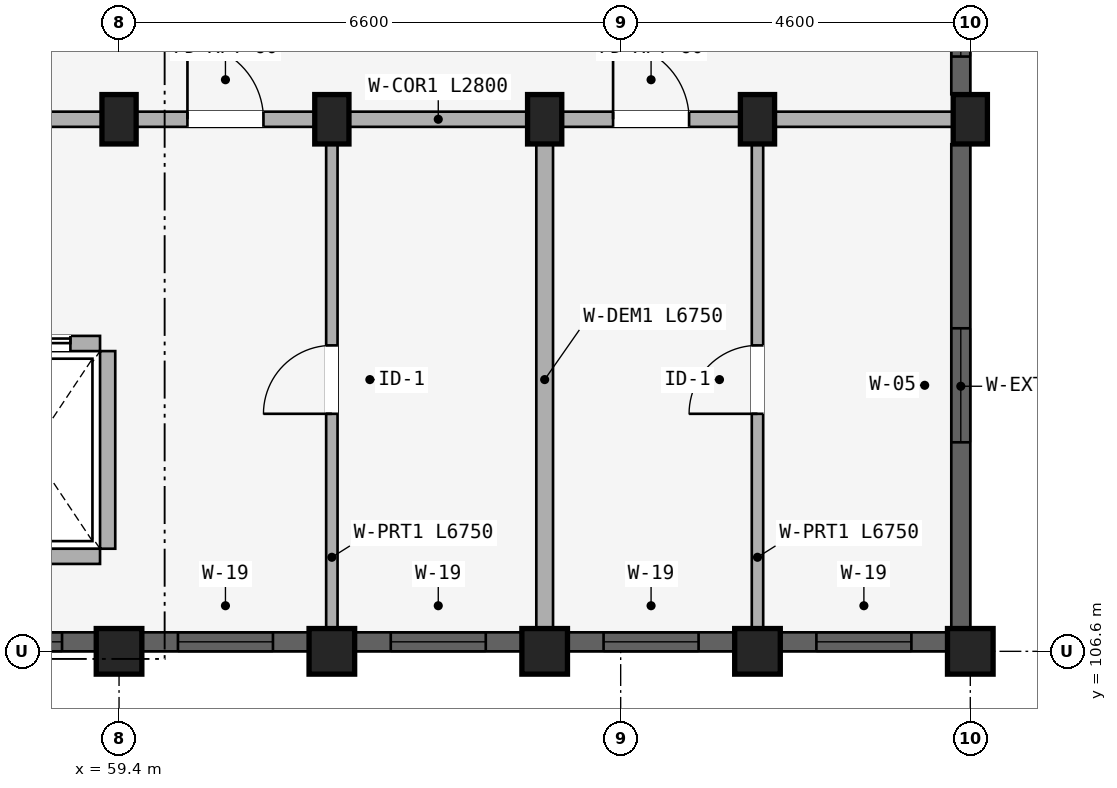
"""IFC4 building model, lengths in metres.
Left out: names, types, materials, properties, quantities, classifications, styles, units other than length and angle.
Written with IfcOpenShell. Run it as: python <this file> out.ifc"""

import sys

from ifc_helpers import new_model, si_unit, direction, frame, frame_2d, origin, origin_2d, place, context, subcontext, project, spatial, rectangle, extrude, element, fill, save


model = new_model("IFC4")
c1 = context("Model", 3, precision=1e-05, world=origin(), true_north=direction((0.0, 1.0)))
c2 = subcontext(c1, "Body", "Model", "MODEL_VIEW")
j1 = project(units=[si_unit("LENGTHUNIT", "METRE"), si_unit("PLANEANGLEUNIT", "RADIAN")], contexts=[c1])
p1 = place(None, origin())
s1 = spatial("IfcSite", under=j1, at=p1, CompositionType="ELEMENT")
p2 = place(p1, origin())
s2 = spatial("IfcBuilding", under=s1, at=p2, CompositionType="ELEMENT")
p3 = place(p2, frame((0.0, 0.0, 37.05)))
s3 = spatial("IfcBuildingStorey", under=s2, at=p3, CompositionType="ELEMENT", Elevation=37.05)
p4 = place(p3, frame((59.4, 106.6, 0.0), z_axis=(0.0, 0.0, 1.0), x_axis=(1.0, 0.0, 0.0)))
e1 = element("IfcColumn", 1, at=p4, inside=s3, PredefinedType="COLUMN", context=c2, shape_type="SweptSolid", body=[
    extrude(rectangle(XDim=0.6, YDim=0.6, at=origin_2d()), origin(), (0.0, 0.0, 1.0), 2.93),
])
p5 = place(p3, frame((59.4, 113.6, 0.0), z_axis=(0.0, 0.0, 1.0), x_axis=(1.0, 0.0, 0.0)))
e2 = element("IfcColumn", 2, at=p5, inside=s3, PredefinedType="COLUMN", context=c2, shape_type="SweptSolid", body=[
    extrude(rectangle(XDim=0.45, YDim=0.65, at=origin_2d()), origin(), (0.0, 0.0, 1.0), 2.93),
])
p6 = place(p3, frame((62.2, 106.6, 0.0), z_axis=(0.0, 0.0, 1.0), x_axis=(1.0, 0.0, 0.0)))
e3 = element("IfcColumn", 3, at=p6, inside=s3, PredefinedType="COLUMN", context=c2, shape_type="SweptSolid", body=[
    extrude(rectangle(XDim=0.6, YDim=0.6, at=origin_2d()), origin(), (0.0, 0.0, 1.0), 2.93),
])
p7 = place(p3, frame((62.2, 113.6, 0.0), z_axis=(0.0, 0.0, 1.0), x_axis=(1.0, 0.0, 0.0)))
e4 = element("IfcColumn", 4, at=p7, inside=s3, PredefinedType="COLUMN", context=c2, shape_type="SweptSolid", body=[
    extrude(rectangle(XDim=0.45, YDim=0.65, at=origin_2d()), origin(), (0.0, 0.0, 1.0), 2.93),
])
p8 = place(p3, frame((65.0, 106.6, 0.0), z_axis=(0.0, 0.0, 1.0), x_axis=(1.0, 0.0, 0.0)))
e5 = element("IfcColumn", 5, at=p8, inside=s3, PredefinedType="COLUMN", context=c2, shape_type="SweptSolid", body=[
    extrude(rectangle(XDim=0.6, YDim=0.6, at=origin_2d()), origin(), (0.0, 0.0, 1.0), 2.93),
])
p9 = place(p3, frame((65.0, 113.6, 0.0), z_axis=(0.0, 0.0, 1.0), x_axis=(1.0, 0.0, 0.0)))
e6 = element("IfcColumn", 6, at=p9, inside=s3, PredefinedType="COLUMN", context=c2, shape_type="SweptSolid", body=[
    extrude(rectangle(XDim=0.45, YDim=0.65, at=origin_2d()), origin(), (0.0, 0.0, 1.0), 2.93),
])
p10 = place(p3, frame((67.8, 106.6, 0.0), z_axis=(0.0, 0.0, 1.0), x_axis=(1.0, 0.0, 0.0)))
e7 = element("IfcColumn", 7, at=p10, inside=s3, PredefinedType="COLUMN", context=c2, shape_type="SweptSolid", body=[
    extrude(rectangle(XDim=0.6, YDim=0.6, at=origin_2d()), origin(), (0.0, 0.0, 1.0), 2.93),
])
p11 = place(p3, frame((67.8, 113.6, 0.0), z_axis=(0.0, 0.0, 1.0), x_axis=(1.0, 0.0, 0.0)))
e8 = element("IfcColumn", 8, at=p11, inside=s3, PredefinedType="COLUMN", context=c2, shape_type="SweptSolid", body=[
    extrude(rectangle(XDim=0.45, YDim=0.65, at=origin_2d()), origin(), (0.0, 0.0, 1.0), 2.93),
])
p12 = place(p3, frame((70.6, 106.6, 0.0), z_axis=(0.0, 0.0, 1.0), x_axis=(1.0, 0.0, 0.0)))
e9 = element("IfcColumn", 9, at=p12, inside=s3, PredefinedType="COLUMN", context=c2, shape_type="SweptSolid", body=[
    extrude(rectangle(XDim=0.6, YDim=0.6, at=origin_2d()), origin(), (0.0, 0.0, 1.0), 2.93),
])
p13 = place(p3, frame((70.6, 113.6, 0.0), z_axis=(0.0, 0.0, 1.0), x_axis=(1.0, 0.0, 0.0)))
e10 = element("IfcColumn", 10, at=p13, inside=s3, PredefinedType="COLUMN", context=c2, shape_type="SweptSolid", body=[
    extrude(rectangle(XDim=0.45, YDim=0.65, at=origin_2d()), origin(), (0.0, 0.0, 1.0), 2.93),
])
p14 = place(p3, frame((59.25, 107.95, 0.0), z_axis=(0.0, 0.0, 1.0), x_axis=(0.0, 1.0, 0.0)))
e11 = element("IfcWall", 11, at=p14, inside=s3, PredefinedType="STANDARD", context=c2, shape_type="SweptSolid", body=[
    extrude(rectangle(XDim=2.6, YDim=0.2, at=frame_2d((1.3, 0.0))), origin(), (0.0, 0.0, 1.0), 2.372),
])
p15 = place(p3, frame((57.35, 107.85, 0.0), z_axis=(0.0, 0.0, 1.0), x_axis=(1.0, 0.0, 0.0)))
e12 = element("IfcWall", 12, at=p15, inside=s3, PredefinedType="STANDARD", context=c2, shape_type="SweptSolid", body=[
    extrude(rectangle(XDim=1.8, YDim=0.2, at=frame_2d((0.9, 0.0))), origin(), (0.0, 0.0, 1.0), 2.93),
])
p16 = place(p3, frame((57.35, 110.65, 0.0), z_axis=(0.0, 0.0, 1.0), x_axis=(1.0, 0.0, 0.0)))
e13 = element("IfcWall", 13, at=p16, inside=s3, PredefinedType="STANDARD", context=c2, shape_type="SweptSolid", body=[
    extrude(rectangle(XDim=1.8, YDim=0.2, at=frame_2d((0.9, 0.0))), origin(), (0.0, 0.0, 1.0), 2.93),
])
p17 = place(p16, frame((0.39, 0.0, 0.0)))
e14 = element("IfcOpeningElement", 14, at=p17, cuts=e13, PredefinedType="OPENING", context=c2, shape_type="SweptSolid", body=[
    extrude(rectangle(XDim=1.02, YDim=2.15, at=frame_2d((0.51, 1.075))), frame((0.0, 0.11, 0.0), z_axis=(0.0, -1.0, 0.0), x_axis=(1.0, 0.0, 0.0)), (0.0, 0.0, 1.0), 0.22),
])
p18 = place(p3, frame((53.75, 113.6, 0.0), z_axis=(0.0, 0.0, 1.0), x_axis=(1.0, 0.0, 0.0)))
e15 = element("IfcWall", 15, at=p18, inside=s3, PredefinedType="STANDARD", context=c2, shape_type="SweptSolid", body=[
    extrude(rectangle(XDim=5.6, YDim=0.2, at=frame_2d((2.8, 0.0))), origin(), (0.0, 0.0, 1.0), 2.372),
])
p19 = place(p18, frame((1.91, 0.0, 0.0)))
e16 = element("IfcOpeningElement", 16, at=p19, cuts=e15, PredefinedType="OPENING", context=c2, shape_type="SweptSolid", body=[
    extrude(rectangle(XDim=1.22, YDim=2.15, at=frame_2d((0.61, 1.075))), frame((0.0, 0.11, 0.0), z_axis=(0.0, -1.0, 0.0), x_axis=(1.0, 0.0, 0.0)), (0.0, 0.0, 1.0), 0.22),
])
p20 = place(p3, frame((59.4, 113.6, 0.0), z_axis=(0.0, 0.0, 1.0), x_axis=(1.0, 0.0, 0.0)))
e17 = element("IfcWall", 17, at=p20, inside=s3, PredefinedType="STANDARD", context=c2, shape_type="SweptSolid", body=[
    extrude(rectangle(XDim=2.8, YDim=0.2, at=frame_2d((1.4, 0.0))), origin(), (0.0, 0.0, 1.0), 2.372),
])
p21 = place(p20, frame((0.9, 0.0, 0.0)))
e18 = element("IfcOpeningElement", 18, at=p21, cuts=e17, PredefinedType="OPENING", context=c2, shape_type="SweptSolid", body=[
    extrude(rectangle(XDim=1.0, YDim=2.15, at=frame_2d((0.5, 1.075))), frame((0.0, 0.11, 0.0), z_axis=(0.0, -1.0, 0.0), x_axis=(1.0, 0.0, 0.0)), (0.0, 0.0, 1.0), 0.22),
])
p22 = place(p3, frame((62.2, 113.6, 0.0), z_axis=(0.0, 0.0, 1.0), x_axis=(1.0, 0.0, 0.0)))
e19 = element("IfcWall", 19, at=p22, inside=s3, PredefinedType="STANDARD", context=c2, shape_type="SweptSolid", body=[
    extrude(rectangle(XDim=2.8, YDim=0.2, at=frame_2d((1.4, 0.0))), origin(), (0.0, 0.0, 1.0), 2.372),
])
p23 = place(p3, frame((65.0, 113.6, 0.0), z_axis=(0.0, 0.0, 1.0), x_axis=(1.0, 0.0, 0.0)))
e20 = element("IfcWall", 20, at=p23, inside=s3, PredefinedType="STANDARD", context=c2, shape_type="SweptSolid", body=[
    extrude(rectangle(XDim=2.8, YDim=0.2, at=frame_2d((1.4, 0.0))), origin(), (0.0, 0.0, 1.0), 2.372),
])
p24 = place(p23, frame((0.9, 0.0, 0.0)))
e21 = element("IfcOpeningElement", 21, at=p24, cuts=e20, PredefinedType="OPENING", context=c2, shape_type="SweptSolid", body=[
    extrude(rectangle(XDim=1.0, YDim=2.15, at=frame_2d((0.5, 1.075))), frame((0.0, 0.11, 0.0), z_axis=(0.0, -1.0, 0.0), x_axis=(1.0, 0.0, 0.0)), (0.0, 0.0, 1.0), 0.22),
])
p25 = place(p3, frame((67.8, 113.6, 0.0), z_axis=(0.0, 0.0, 1.0), x_axis=(1.0, 0.0, 0.0)))
e22 = element("IfcWall", 22, at=p25, inside=s3, PredefinedType="STANDARD", context=c2, shape_type="SweptSolid", body=[
    extrude(rectangle(XDim=2.8, YDim=0.2, at=frame_2d((1.4, 0.0))), origin(), (0.0, 0.0, 1.0), 2.372),
])
p26 = place(p3, frame((62.2, 106.8, 0.0), z_axis=(0.0, 0.0, 1.0), x_axis=(0.0, 1.0, 0.0)))
e23 = element("IfcWall", 23, at=p26, inside=s3, PredefinedType="PARTITIONING", context=c2, shape_type="SweptSolid", body=[
    extrude(rectangle(XDim=6.75, YDim=0.15, at=frame_2d((3.375, 0.0))), origin(), (0.0, 0.0, 1.0), 2.372),
])
p27 = place(p26, frame((2.925, 0.0, 0.0)))
e24 = element("IfcOpeningElement", 24, at=p27, cuts=e23, PredefinedType="OPENING", context=c2, shape_type="SweptSolid", body=[
    extrude(rectangle(XDim=0.9, YDim=2.1, at=frame_2d((0.45, 1.05))), frame((0.0, 0.085, 0.0), z_axis=(0.0, -1.0, 0.0), x_axis=(1.0, 0.0, 0.0)), (0.0, 0.0, 1.0), 0.17),
])
p28 = place(p3, frame((65.0, 106.8, 0.0), z_axis=(0.0, 0.0, 1.0), x_axis=(0.0, 1.0, 0.0)))
e25 = element("IfcWall", 25, at=p28, inside=s3, PredefinedType="STANDARD", context=c2, shape_type="SweptSolid", body=[
    extrude(rectangle(XDim=6.75, YDim=0.22, at=frame_2d((3.375, 0.0))), origin(), (0.0, 0.0, 1.0), 2.372),
])
p29 = place(p3, frame((67.8, 106.8, 0.0), z_axis=(0.0, 0.0, 1.0), x_axis=(0.0, 1.0, 0.0)))
e26 = element("IfcWall", 26, at=p29, inside=s3, PredefinedType="PARTITIONING", context=c2, shape_type="SweptSolid", body=[
    extrude(rectangle(XDim=6.75, YDim=0.15, at=frame_2d((3.375, 0.0))), origin(), (0.0, 0.0, 1.0), 2.372),
])
p30 = place(p29, frame((2.925, 0.0, 0.0)))
e27 = element("IfcOpeningElement", 27, at=p30, cuts=e26, PredefinedType="OPENING", context=c2, shape_type="SweptSolid", body=[
    extrude(rectangle(XDim=0.9, YDim=2.1, at=frame_2d((0.45, 1.05))), frame((0.0, 0.085, 0.0), z_axis=(0.0, -1.0, 0.0), x_axis=(1.0, 0.0, 0.0)), (0.0, 0.0, 1.0), 0.17),
])
p31 = place(p3, frame((56.628, 106.725, 0.0), z_axis=(0.0, 0.0, 1.0), x_axis=(1.0, 0.0, 0.0)))
e28 = element("IfcWall", 28, at=p31, inside=s3, PredefinedType="STANDARD", context=c2, shape_type="SweptSolid", body=[
    extrude(rectangle(XDim=2.468, YDim=0.25, at=frame_2d((1.234, 0.0))), origin(), (0.0, 0.0, 1.0), 2.472),
])
p32 = place(p31, frame((0.822, 0.0, 0.772)))
e29 = element("IfcOpeningElement", 29, at=p32, cuts=e28, PredefinedType="OPENING", context=c2, shape_type="SweptSolid", body=[
    extrude(rectangle(XDim=1.2, YDim=1.5, at=frame_2d((0.6, 0.75))), frame((0.0, 0.135, 0.0), z_axis=(0.0, -1.0, 0.0), x_axis=(1.0, 0.0, 0.0)), (0.0, 0.0, 1.0), 0.27),
])
p33 = place(p3, frame((59.704, 106.725, 0.0), z_axis=(0.0, 0.0, 1.0), x_axis=(1.0, 0.0, 0.0)))
e30 = element("IfcWall", 30, at=p33, inside=s3, PredefinedType="STANDARD", context=c2, shape_type="SweptSolid", body=[
    extrude(rectangle(XDim=2.193, YDim=0.25, at=frame_2d((1.096, 0.0))), origin(), (0.0, 0.0, 1.0), 2.472),
])
p34 = place(p33, frame((0.471, 0.0, 0.722)))
e31 = element("IfcOpeningElement", 31, at=p34, cuts=e30, PredefinedType="OPENING", context=c2, shape_type="SweptSolid", body=[
    extrude(rectangle(XDim=1.25, YDim=1.55, at=frame_2d((0.625, 0.775))), frame((0.0, 0.135, 0.0), z_axis=(0.0, -1.0, 0.0), x_axis=(1.0, 0.0, 0.0)), (0.0, 0.0, 1.0), 0.27),
])
p35 = place(p3, frame((62.503, 106.725, 0.0), z_axis=(0.0, 0.0, 1.0), x_axis=(1.0, 0.0, 0.0)))
e32 = element("IfcWall", 32, at=p35, inside=s3, PredefinedType="STANDARD", context=c2, shape_type="SweptSolid", body=[
    extrude(rectangle(XDim=2.193, YDim=0.25, at=frame_2d((1.097, 0.0))), origin(), (0.0, 0.0, 1.0), 2.472),
])
p36 = place(p35, frame((0.471, 0.0, 0.722)))
e33 = element("IfcOpeningElement", 33, at=p36, cuts=e32, PredefinedType="OPENING", context=c2, shape_type="SweptSolid", body=[
    extrude(rectangle(XDim=1.25, YDim=1.55, at=frame_2d((0.625, 0.775))), frame((0.0, 0.135, 0.0), z_axis=(0.0, -1.0, 0.0), x_axis=(1.0, 0.0, 0.0)), (0.0, 0.0, 1.0), 0.27),
])
p37 = place(p3, frame((65.303, 106.725, 0.0), z_axis=(0.0, 0.0, 1.0), x_axis=(1.0, 0.0, 0.0)))
e34 = element("IfcWall", 34, at=p37, inside=s3, PredefinedType="STANDARD", context=c2, shape_type="SweptSolid", body=[
    extrude(rectangle(XDim=2.193, YDim=0.25, at=frame_2d((1.097, 0.0))), origin(), (0.0, 0.0, 1.0), 2.472),
])
p38 = place(p37, frame((0.471, 0.0, 0.722)))
e35 = element("IfcOpeningElement", 35, at=p38, cuts=e34, PredefinedType="OPENING", context=c2, shape_type="SweptSolid", body=[
    extrude(rectangle(XDim=1.25, YDim=1.55, at=frame_2d((0.625, 0.775))), frame((0.0, 0.135, 0.0), z_axis=(0.0, -1.0, 0.0), x_axis=(1.0, 0.0, 0.0)), (0.0, 0.0, 1.0), 0.27),
])
p39 = place(p3, frame((68.104, 106.725, 0.0), z_axis=(0.0, 0.0, 1.0), x_axis=(1.0, 0.0, 0.0)))
e36 = element("IfcWall", 36, at=p39, inside=s3, PredefinedType="STANDARD", context=c2, shape_type="SweptSolid", body=[
    extrude(rectangle(XDim=2.193, YDim=0.25, at=frame_2d((1.096, 0.0))), origin(), (0.0, 0.0, 1.0), 2.472),
])
p40 = place(p39, frame((0.471, 0.0, 0.722)))
e37 = element("IfcOpeningElement", 37, at=p40, cuts=e36, PredefinedType="OPENING", context=c2, shape_type="SweptSolid", body=[
    extrude(rectangle(XDim=1.25, YDim=1.55, at=frame_2d((0.625, 0.775))), frame((0.0, 0.135, 0.0), z_axis=(0.0, -1.0, 0.0), x_axis=(1.0, 0.0, 0.0)), (0.0, 0.0, 1.0), 0.27),
])
p41 = place(p3, frame((70.475, 106.904, 0.0), z_axis=(0.0, 0.0, 1.0), x_axis=(0.0, 1.0, 0.0)))
e38 = element("IfcWall", 38, at=p41, inside=s3, PredefinedType="STANDARD", context=c2, shape_type="SweptSolid", body=[
    extrude(rectangle(XDim=6.368, YDim=0.25, at=frame_2d((3.184, 0.0))), origin(), (0.0, 0.0, 1.0), 2.372),
])
p42 = place(p41, frame((2.447, 0.0, 0.522)))
e39 = element("IfcOpeningElement", 39, at=p42, cuts=e38, PredefinedType="OPENING", context=c2, shape_type="SweptSolid", body=[
    extrude(rectangle(XDim=1.5, YDim=1.65, at=frame_2d((0.75, 0.825))), frame((0.0, 0.135, 0.0), z_axis=(0.0, -1.0, 0.0), x_axis=(1.0, 0.0, 0.0)), (0.0, 0.0, 1.0), 0.27),
])
p43 = place(p3, frame((70.475, 113.928, 0.0), z_axis=(0.0, 0.0, 1.0), x_axis=(0.0, 1.0, 0.0)))
e40 = element("IfcWall", 40, at=p43, inside=s3, PredefinedType="STANDARD", context=c2, shape_type="SweptSolid", body=[
    extrude(rectangle(XDim=1.743, YDim=0.25, at=frame_2d((0.872, 0.0))), origin(), (0.0, 0.0, 1.0), 2.372),
])
p44 = place(p43, frame((0.497, 0.0, 0.88)))
e41 = element("IfcOpeningElement", 41, at=p44, cuts=e40, PredefinedType="OPENING", context=c2, shape_type="SweptSolid", body=[
    extrude(rectangle(XDim=0.75, YDim=1.05, at=frame_2d((0.375, 0.525))), frame((0.0, 0.135, 0.0), z_axis=(0.0, -1.0, 0.0), x_axis=(1.0, 0.0, 0.0)), (0.0, 0.0, 1.0), 0.27),
])
p45 = place(p32, origin())
e42 = element("IfcWindow", 42, at=p45, inside=s3, PartitioningType="SINGLE_PANEL", PredefinedType="WINDOW", context=c2, shape_type="SweptSolid", body=[
    extrude(rectangle(XDim=1.2, YDim=1.5, at=frame_2d((0.6, 0.75))), frame((0.0, 0.03, 0.0), z_axis=(0.0, -1.0, 0.0), x_axis=(1.0, 0.0, 0.0)), (0.0, 0.0, 1.0), 0.06),
])
fill(e29, e42)
p46 = place(p34, origin())
e43 = element("IfcWindow", 43, at=p46, inside=s3, PartitioningType="SINGLE_PANEL", PredefinedType="WINDOW", context=c2, shape_type="SweptSolid", body=[
    extrude(rectangle(XDim=1.25, YDim=1.55, at=frame_2d((0.625, 0.775))), frame((0.0, 0.03, 0.0), z_axis=(0.0, -1.0, 0.0), x_axis=(1.0, 0.0, 0.0)), (0.0, 0.0, 1.0), 0.06),
])
fill(e31, e43)
p47 = place(p36, origin())
e44 = element("IfcWindow", 44, at=p47, inside=s3, PartitioningType="SINGLE_PANEL", PredefinedType="WINDOW", context=c2, shape_type="SweptSolid", body=[
    extrude(rectangle(XDim=1.25, YDim=1.55, at=frame_2d((0.625, 0.775))), frame((0.0, 0.03, 0.0), z_axis=(0.0, -1.0, 0.0), x_axis=(1.0, 0.0, 0.0)), (0.0, 0.0, 1.0), 0.06),
])
fill(e33, e44)
p48 = place(p38, origin())
e45 = element("IfcWindow", 45, at=p48, inside=s3, PartitioningType="SINGLE_PANEL", PredefinedType="WINDOW", context=c2, shape_type="SweptSolid", body=[
    extrude(rectangle(XDim=1.25, YDim=1.55, at=frame_2d((0.625, 0.775))), frame((0.0, 0.03, 0.0), z_axis=(0.0, -1.0, 0.0), x_axis=(1.0, 0.0, 0.0)), (0.0, 0.0, 1.0), 0.06),
])
fill(e35, e45)
p49 = place(p40, origin())
e46 = element("IfcWindow", 46, at=p49, inside=s3, PartitioningType="SINGLE_PANEL", PredefinedType="WINDOW", context=c2, shape_type="SweptSolid", body=[
    extrude(rectangle(XDim=1.25, YDim=1.55, at=frame_2d((0.625, 0.775))), frame((0.0, 0.03, 0.0), z_axis=(0.0, -1.0, 0.0), x_axis=(1.0, 0.0, 0.0)), (0.0, 0.0, 1.0), 0.06),
])
fill(e37, e46)
p50 = place(p42, origin())
e47 = element("IfcWindow", 47, at=p50, inside=s3, PartitioningType="DOUBLE_PANEL_VERTICAL", PredefinedType="WINDOW", context=c2, shape_type="SweptSolid", body=[
    extrude(rectangle(XDim=1.5, YDim=1.65, at=frame_2d((0.75, 0.825))), frame((0.0, 0.03, 0.0), z_axis=(0.0, -1.0, 0.0), x_axis=(1.0, 0.0, 0.0)), (0.0, 0.0, 1.0), 0.06),
])
fill(e39, e47)
p51 = place(p44, origin())
e48 = element("IfcWindow", 48, at=p51, inside=s3, PartitioningType="SINGLE_PANEL", PredefinedType="WINDOW", context=c2, shape_type="SweptSolid", body=[
    extrude(rectangle(XDim=0.75, YDim=1.05, at=frame_2d((0.375, 0.525))), frame((0.0, 0.03, 0.0), z_axis=(0.0, -1.0, 0.0), x_axis=(1.0, 0.0, 0.0)), (0.0, 0.0, 1.0), 0.06),
])
fill(e41, e48)
p52 = place(p17, origin())
e49 = element("IfcDoor", 49, at=p52, inside=s3, OperationType="SLIDING_TO_RIGHT", PredefinedType="DOOR", context=c2, shape_type="SweptSolid", body=[
    extrude(rectangle(XDim=1.02, YDim=2.15, at=frame_2d((0.51, 1.075))), frame((0.0, 0.025, 0.0), z_axis=(0.0, -1.0, 0.0), x_axis=(1.0, 0.0, 0.0)), (0.0, 0.0, 1.0), 0.05),
])
fill(e14, e49)
p53 = place(p21, frame((1.0, 0.0, 0.0), z_axis=(0.0, 0.0, 1.0), x_axis=(-1.0, 0.0, 0.0)))
e50 = element("IfcDoor", 50, at=p53, inside=s3, OperationType="SINGLE_SWING_RIGHT", PredefinedType="DOOR", context=c2, shape_type="SweptSolid", body=[
    extrude(rectangle(XDim=1.0, YDim=2.15, at=frame_2d((0.5, 1.075))), frame((0.0, 0.025, 0.0), z_axis=(0.0, -1.0, 0.0), x_axis=(1.0, 0.0, 0.0)), (0.0, 0.0, 1.0), 0.05),
])
fill(e18, e50)
p54 = place(p24, frame((1.0, 0.0, 0.0), z_axis=(0.0, 0.0, 1.0), x_axis=(-1.0, 0.0, 0.0)))
e51 = element("IfcDoor", 51, at=p54, inside=s3, OperationType="SINGLE_SWING_RIGHT", PredefinedType="DOOR", context=c2, shape_type="SweptSolid", body=[
    extrude(rectangle(XDim=1.0, YDim=2.15, at=frame_2d((0.5, 1.075))), frame((0.0, 0.025, 0.0), z_axis=(0.0, -1.0, 0.0), x_axis=(1.0, 0.0, 0.0)), (0.0, 0.0, 1.0), 0.05),
])
fill(e21, e51)
p55 = place(p27, origin())
e52 = element("IfcDoor", 52, at=p55, inside=s3, OperationType="SINGLE_SWING_LEFT", PredefinedType="DOOR", context=c2, shape_type="SweptSolid", body=[
    extrude(rectangle(XDim=0.9, YDim=2.1, at=frame_2d((0.45, 1.05))), frame((0.0, 0.025, 0.0), z_axis=(0.0, -1.0, 0.0), x_axis=(1.0, 0.0, 0.0)), (0.0, 0.0, 1.0), 0.05),
])
fill(e24, e52)
p56 = place(p30, frame((0.9, 0.0, 0.0), z_axis=(0.0, 0.0, 1.0), x_axis=(-1.0, 0.0, 0.0)))
e53 = element("IfcDoor", 53, at=p56, inside=s3, OperationType="SINGLE_SWING_RIGHT", PredefinedType="DOOR", context=c2, shape_type="SweptSolid", body=[
    extrude(rectangle(XDim=0.9, YDim=2.1, at=frame_2d((0.45, 1.05))), frame((0.0, 0.025, 0.0), z_axis=(0.0, -1.0, 0.0), x_axis=(1.0, 0.0, 0.0)), (0.0, 0.0, 1.0), 0.05),
])
fill(e27, e53)
save(model, sys.argv[1])
